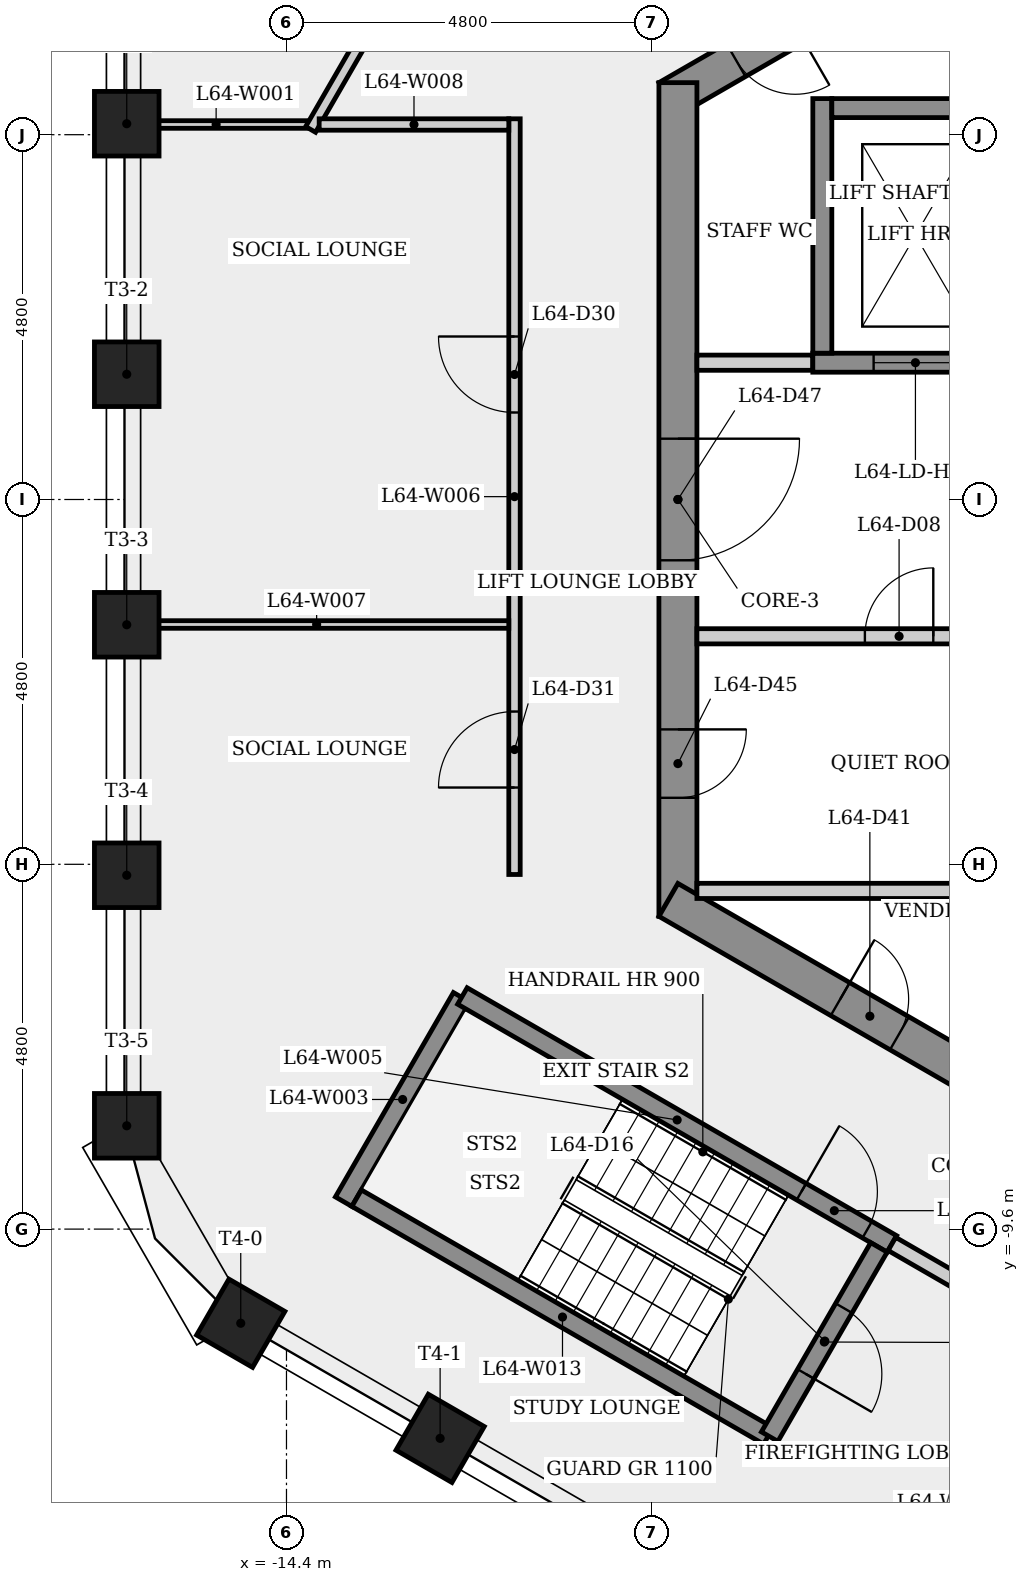
"""IFC4 building model, lengths in metres.
Left out: names, types, materials, properties, quantities, classifications, styles, units other than length and angle.
Written with IfcOpenShell. Run it as: python <this file> out.ifc"""

import sys

from ifc_helpers import new_model, si_unit, direction, frame, frame_2d, origin, origin_2d, place, context, subcontext, project, spatial, rectangle, extrude, element, fill, save


model = new_model("IFC4")
c1 = context("Model", 3, precision=1e-05, world=origin(), true_north=direction((0.0, 1.0)))
c2 = subcontext(c1, "Body", "Model", "MODEL_VIEW")
j1 = project(units=[si_unit("LENGTHUNIT", "METRE"), si_unit("PLANEANGLEUNIT", "RADIAN")], contexts=[c1])
p1 = place(None, origin())
s1 = spatial("IfcSite", under=j1, at=p1, CompositionType="ELEMENT")
p2 = place(p1, origin())
s2 = spatial("IfcBuilding", under=s1, at=p2, CompositionType="ELEMENT")
p3 = place(p2, frame((0.0, 0.0, 239.3)))
s3 = spatial("IfcBuildingStorey", under=s2, at=p3, CompositionType="ELEMENT", Elevation=239.3)
p4 = place(p3, frame((0.125, 10.753, 0.0), z_axis=(0.0, 0.0, 1.0), x_axis=(-0.866023993627, -0.500002442456, 0.0)))
e1 = element("IfcWall", 1, at=p4, inside=s3, PredefinedType="SHEAR", context=c2, shape_type="SweptSolid", body=[
    extrude(rectangle(XDim=10.97, YDim=0.5, at=frame_2d((5.485, 0.0))), origin(), (0.0, 0.0, 1.0), 3.4),
])
p5 = place(p4, frame((9.043, 0.0, 0.0)))
e2 = element("IfcOpeningElement", 2, at=p5, cuts=e1, PredefinedType="OPENING", context=c2, shape_type="SweptSolid", body=[
    extrude(rectangle(XDim=0.9, YDim=2.1, at=frame_2d((0.45, 1.05))), frame((0.0, 0.26, 0.0), z_axis=(0.0, -1.0, 0.0), x_axis=(1.0, 0.0, 0.0)), (0.0, 0.0, 1.0), 0.52),
])
p6 = place(p4, frame((2.38, 0.0, 0.0)))
e3 = element("IfcOpeningElement", 3, at=p6, cuts=e1, PredefinedType="OPENING", context=c2, shape_type="SweptSolid", body=[
    extrude(rectangle(XDim=0.9, YDim=2.1, at=frame_2d((0.45, 1.05))), frame((0.0, 0.26, 0.0), z_axis=(0.0, -1.0, 0.0), x_axis=(1.0, 0.0, 0.0)), (0.0, 0.0, 1.0), 0.52),
])
p7 = place(p3, frame((-9.25, 5.485, 0.0), z_axis=(0.0, 0.0, 1.0), x_axis=(0.0, -1.0, 0.0)))
e4 = element("IfcWall", 4, at=p7, inside=s3, PredefinedType="SHEAR", context=c2, shape_type="SweptSolid", body=[
    extrude(rectangle(XDim=10.97, YDim=0.5, at=frame_2d((5.485, 0.0))), origin(), (0.0, 0.0, 1.0), 3.4),
])
p8 = place(p7, frame((8.51, 0.0, 0.0)))
e5 = element("IfcOpeningElement", 5, at=p8, cuts=e4, PredefinedType="OPENING", context=c2, shape_type="SweptSolid", body=[
    extrude(rectangle(XDim=0.9, YDim=2.1, at=frame_2d((0.45, 1.05))), frame((0.0, 0.26, 0.0), z_axis=(0.0, -1.0, 0.0), x_axis=(1.0, 0.0, 0.0)), (0.0, 0.0, 1.0), 0.52),
])
p9 = place(p7, frame((4.685, 0.0, 0.0)))
e6 = element("IfcOpeningElement", 6, at=p9, cuts=e4, PredefinedType="OPENING", context=c2, shape_type="SweptSolid", body=[
    extrude(rectangle(XDim=1.6, YDim=2.1, at=frame_2d((0.8, 1.05))), frame((0.0, 0.26, 0.0), z_axis=(0.0, -1.0, 0.0), x_axis=(1.0, 0.0, 0.0)), (0.0, 0.0, 1.0), 0.52),
])
p10 = place(p3, frame((-9.375, -5.268, 0.0), z_axis=(0.0, 0.0, 1.0), x_axis=(0.866023993627, -0.500002442456, 0.0)))
e7 = element("IfcWall", 7, at=p10, inside=s3, PredefinedType="SHEAR", context=c2, shape_type="SweptSolid", body=[
    extrude(rectangle(XDim=10.97, YDim=0.5, at=frame_2d((5.485, 0.0))), origin(), (0.0, 0.0, 1.0), 3.4),
])
p11 = place(p10, frame((2.611, 0.0, 0.0)))
e8 = element("IfcOpeningElement", 8, at=p11, cuts=e7, PredefinedType="OPENING", context=c2, shape_type="SweptSolid", body=[
    extrude(rectangle(XDim=0.9, YDim=2.1, at=frame_2d((0.45, 1.05))), frame((0.0, 0.26, 0.0), z_axis=(0.0, -1.0, 0.0), x_axis=(1.0, 0.0, 0.0)), (0.0, 0.0, 1.0), 0.52),
])
p12 = place(p10, frame((7.229, 0.0, 0.0)))
e9 = element("IfcOpeningElement", 9, at=p12, cuts=e7, PredefinedType="OPENING", context=c2, shape_type="SweptSolid", body=[
    extrude(rectangle(XDim=0.9, YDim=2.1, at=frame_2d((0.45, 1.05))), frame((0.0, 0.26, 0.0), z_axis=(0.0, -1.0, 0.0), x_axis=(1.0, 0.0, 0.0)), (0.0, 0.0, 1.0), 0.52),
])
for number, where, z_axis, x_axis in (
    (10, (-16.502, 4.944, 0.0), (0.0, 0.0, 1.0), (-1.0, 0.0, 0.0)),
    (11, (-16.502, 1.648, 0.0), (0.0, 0.0, 1.0), (-1.0, 0.0, 0.0)),
    (12, (-16.502, -1.648, 0.0), (0.0, 0.0, 1.0), (-1.0, 0.0, 0.0)),
    (13, (-16.502, -4.944, 0.0), (0.0, 0.0, 1.0), (-1.0, 0.0, 0.0)),
    (14, (-16.502, -8.241, 0.0), (0.0, 0.0, 1.0), (-1.0, 0.0, 0.0)),
    (15, (-15.002, -10.839, 0.0), (0.0, 0.0, 1.0), (-0.5, -0.866, 0.0)),
    (16, (-12.379, -12.353, 0.0), (0.0, 0.0, 1.0), (-0.5, -0.866, 0.0)),
):
    element("IfcColumn", number, at=place(p3, frame(where, z_axis=z_axis, x_axis=x_axis)), inside=s3, PredefinedType="COLUMN", context=c2, shape_type="SweptSolid", body=[
        extrude(rectangle(XDim=0.85, YDim=0.85, at=origin_2d()), origin(), (0.0, 0.0, 1.0), 3.4),
    ])
p13 = place(p3, frame((-14.12, 4.934, 0.0), z_axis=(0.0, 0.0, 1.0), x_axis=(-1.0, 0.0, 0.0)))
e17 = element("IfcWall", 17, at=p13, inside=s3, PredefinedType="PARTITIONING", context=c2, shape_type="SweptSolid", body=[
    extrude(rectangle(XDim=2.412, YDim=0.1, at=frame_2d((1.206, 0.0))), origin(), (0.0, 0.0, 1.0), 3.05),
])
p14 = place(p3, frame((-14.083, 4.869, 0.0), z_axis=(0.0, 0.0, 1.0), x_axis=(0.500011139556, 0.866018972263, 0.0)))
e18 = element("IfcWall", 18, at=p14, inside=s3, PredefinedType="PARTITIONING", context=c2, shape_type="SweptSolid", body=[
    extrude(rectangle(XDim=6.076, YDim=0.15, at=frame_2d((3.038, 0.0))), origin(), (0.0, 0.0, 1.0), 3.05),
])
p15 = place(p14, frame((2.538, 0.0, 0.0)))
e19 = element("IfcOpeningElement", 19, at=p15, cuts=e18, PredefinedType="OPENING", context=c2, shape_type="SweptSolid", body=[
    extrude(rectangle(XDim=1.0, YDim=2.1, at=frame_2d((0.5, 1.05))), frame((0.0, 0.085, 0.0), z_axis=(0.0, -1.0, 0.0), x_axis=(1.0, 0.0, 0.0)), (0.0, 0.0, 1.0), 0.17),
])
p16 = place(p3, frame((-13.648, -9.239, 0.0), z_axis=(0.0, 0.0, 1.0), x_axis=(0.500003782172, 0.866023220135, 0.0)))
e20 = element("IfcWall", 20, at=p16, inside=s3, PredefinedType="SHEAR", context=c2, shape_type="SweptSolid", body=[
    extrude(rectangle(XDim=3.105, YDim=0.25, at=frame_2d((1.552, 0.0))), origin(), (0.0, 0.0, 1.0), 3.05),
])
p17 = place(p3, frame((-12.085, -6.532, 0.0), z_axis=(0.0, 0.0, 1.0), x_axis=(0.866031063448, -0.499990197047, 0.0)))
e21 = element("IfcWall", 21, at=p17, inside=s3, PredefinedType="SHEAR", context=c2, shape_type="SweptSolid", body=[
    extrude(rectangle(XDim=6.525, YDim=0.25, at=frame_2d((3.263, 0.0))), origin(), (0.0, 0.0, 1.0), 3.05),
])
p18 = place(p17, frame((5.15, 0.0, 0.0)))
e22 = element("IfcOpeningElement", 22, at=p18, cuts=e21, PredefinedType="OPENING", context=c2, shape_type="SweptSolid", body=[
    extrude(rectangle(XDim=1.0, YDim=2.1, at=frame_2d((0.5, 1.05))), frame((0.0, 0.135, 0.0), z_axis=(0.0, -1.0, 0.0), x_axis=(1.0, 0.0, 0.0)), (0.0, 0.0, 1.0), 0.27),
])
p19 = place(p3, frame((-11.4, -4.934, 0.0), z_axis=(0.0, 0.0, 1.0), x_axis=(0.0, 1.0, 0.0)))
e23 = element("IfcWall", 23, at=p19, inside=s3, PredefinedType="PARTITIONING", context=c2, shape_type="SweptSolid", body=[
    extrude(rectangle(XDim=9.943, YDim=0.15, at=frame_2d((4.972, 0.0))), origin(), (0.0, 0.0, 1.0), 3.05),
])
p20 = place(p19, frame((6.079, 0.0, 0.0)))
e24 = element("IfcOpeningElement", 24, at=p20, cuts=e23, PredefinedType="OPENING", context=c2, shape_type="SweptSolid", body=[
    extrude(rectangle(XDim=1.0, YDim=2.1, at=frame_2d((0.5, 1.05))), frame((0.0, 0.085, 0.0), z_axis=(0.0, -1.0, 0.0), x_axis=(1.0, 0.0, 0.0)), (0.0, 0.0, 1.0), 0.17),
])
p21 = place(p19, frame((1.144, 0.0, 0.0)))
e25 = element("IfcOpeningElement", 25, at=p21, cuts=e23, PredefinedType="OPENING", context=c2, shape_type="SweptSolid", body=[
    extrude(rectangle(XDim=1.0, YDim=2.1, at=frame_2d((0.5, 1.05))), frame((0.0, 0.085, 0.0), z_axis=(0.0, -1.0, 0.0), x_axis=(1.0, 0.0, 0.0)), (0.0, 0.0, 1.0), 0.17),
])
p22 = place(p3, frame((-11.475, -1.645, 0.0), z_axis=(0.0, 0.0, 1.0), x_axis=(-1.0, 0.0, 0.0)))
e26 = element("IfcWall", 26, at=p22, inside=s3, PredefinedType="PARTITIONING", context=c2, shape_type="SweptSolid", body=[
    extrude(rectangle(XDim=5.056, YDim=0.1, at=frame_2d((2.528, 0.0))), origin(), (0.0, 0.0, 1.0), 3.05),
])
p23 = place(p3, frame((-11.475, 4.934, 0.0), z_axis=(0.0, 0.0, 1.0), x_axis=(-1.0, 0.0, 0.0)))
e27 = element("IfcWall", 27, at=p23, inside=s3, PredefinedType="PARTITIONING", context=c2, shape_type="SweptSolid", body=[
    extrude(rectangle(XDim=2.495, YDim=0.15, at=frame_2d((1.248, 0.0))), origin(), (0.0, 0.0, 1.0), 3.05),
])
p24 = place(p3, frame((-9.0, 1.8, 0.0), z_axis=(0.0, 0.0, 1.0), x_axis=(1.0, 0.0, 0.0)))
e28 = element("IfcWall", 28, at=p24, inside=s3, PredefinedType="PARTITIONING", context=c2, shape_type="SweptSolid", body=[
    extrude(rectangle(XDim=1.525, YDim=0.2, at=frame_2d((0.763, 0.0))), origin(), (0.0, 0.0, 1.0), 3.05),
])
p25 = place(p3, frame((-9.0, -5.15, 0.0), z_axis=(0.0, 0.0, 1.0), x_axis=(1.0, 0.0, 0.0)))
e29 = element("IfcWall", 29, at=p25, inside=s3, PredefinedType="PARTITIONING", context=c2, shape_type="SweptSolid", body=[
    extrude(rectangle(XDim=11.325, YDim=0.2, at=frame_2d((5.663, 0.0))), origin(), (0.0, 0.0, 1.0), 3.05),
])
p26 = place(p3, frame((-8.06, -12.321, 0.0), z_axis=(0.0, 0.0, 1.0), x_axis=(-0.866029591389, 0.499992746786, 0.0)))
e30 = element("IfcWall", 30, at=p26, inside=s3, PredefinedType="SHEAR", context=c2, shape_type="SweptSolid", body=[
    extrude(rectangle(XDim=6.255, YDim=0.25, at=frame_2d((3.127, 0.0))), origin(), (0.0, 0.0, 1.0), 3.05),
])
p27 = place(p3, frame((-7.475, 1.8, 0.0), z_axis=(0.0, 0.0, 1.0), x_axis=(1.0, 0.0, 0.0)))
e31 = element("IfcWall", 31, at=p27, inside=s3, PredefinedType="SHEAR", context=c2, shape_type="SweptSolid", body=[
    extrude(rectangle(XDim=14.95, YDim=0.25, at=frame_2d((7.475, 0.0))), origin(), (0.0, 0.0, 1.0), 3.05),
])
p28 = place(p27, frame((0.8, 0.0, 0.0)))
e32 = element("IfcOpeningElement", 32, at=p28, cuts=e31, PredefinedType="OPENING", context=c2, shape_type="SweptSolid", body=[
    extrude(rectangle(XDim=1.1, YDim=2.1, at=frame_2d((0.55, 1.05))), frame((0.0, 0.135, 0.0), z_axis=(0.0, -1.0, 0.0), x_axis=(1.0, 0.0, 0.0)), (0.0, 0.0, 1.0), 0.27),
])
p29 = place(p27, frame((3.25, 0.0, 0.0)))
e33 = element("IfcOpeningElement", 33, at=p29, cuts=e31, PredefinedType="OPENING", context=c2, shape_type="SweptSolid", body=[
    extrude(rectangle(XDim=1.1, YDim=2.1, at=frame_2d((0.55, 1.05))), frame((0.0, 0.135, 0.0), z_axis=(0.0, -1.0, 0.0), x_axis=(1.0, 0.0, 0.0)), (0.0, 0.0, 1.0), 0.27),
])
p30 = place(p27, frame((5.7, 0.0, 0.0)))
e34 = element("IfcOpeningElement", 34, at=p30, cuts=e31, PredefinedType="OPENING", context=c2, shape_type="SweptSolid", body=[
    extrude(rectangle(XDim=1.1, YDim=2.1, at=frame_2d((0.55, 1.05))), frame((0.0, 0.135, 0.0), z_axis=(0.0, -1.0, 0.0), x_axis=(1.0, 0.0, 0.0)), (0.0, 0.0, 1.0), 0.27),
])
p31 = place(p27, frame((8.15, 0.0, 0.0)))
e35 = element("IfcOpeningElement", 35, at=p31, cuts=e31, PredefinedType="OPENING", context=c2, shape_type="SweptSolid", body=[
    extrude(rectangle(XDim=1.1, YDim=2.1, at=frame_2d((0.55, 1.05))), frame((0.0, 0.135, 0.0), z_axis=(0.0, -1.0, 0.0), x_axis=(1.0, 0.0, 0.0)), (0.0, 0.0, 1.0), 0.27),
])
p32 = place(p27, frame((10.6, 0.0, 0.0)))
e36 = element("IfcOpeningElement", 36, at=p32, cuts=e31, PredefinedType="OPENING", context=c2, shape_type="SweptSolid", body=[
    extrude(rectangle(XDim=1.1, YDim=2.1, at=frame_2d((0.55, 1.05))), frame((0.0, 0.135, 0.0), z_axis=(0.0, -1.0, 0.0), x_axis=(1.0, 0.0, 0.0)), (0.0, 0.0, 1.0), 0.27),
])
p33 = place(p27, frame((13.05, 0.0, 0.0)))
e37 = element("IfcOpeningElement", 37, at=p33, cuts=e31, PredefinedType="OPENING", context=c2, shape_type="SweptSolid", body=[
    extrude(rectangle(XDim=1.1, YDim=2.1, at=frame_2d((0.55, 1.05))), frame((0.0, 0.135, 0.0), z_axis=(0.0, -1.0, 0.0), x_axis=(1.0, 0.0, 0.0)), (0.0, 0.0, 1.0), 0.27),
])
p34 = place(p3, frame((-7.35, 1.925, 0.0), z_axis=(0.0, 0.0, 1.0), x_axis=(0.0, 1.0, 0.0)))
e38 = element("IfcWall", 38, at=p34, inside=s3, PredefinedType="SHEAR", context=c2, shape_type="SweptSolid", body=[
    extrude(rectangle(XDim=3.35, YDim=0.25, at=frame_2d((1.675, 0.0))), origin(), (0.0, 0.0, 1.0), 3.05),
])
p35 = place(p3, frame((-7.225, 5.15, 0.0), z_axis=(0.0, 0.0, 1.0), x_axis=(1.0, 0.0, 0.0)))
e39 = element("IfcWall", 39, at=p35, inside=s3, PredefinedType="SHEAR", context=c2, shape_type="SweptSolid", body=[
    extrude(rectangle(XDim=14.7, YDim=0.25, at=frame_2d((7.35, 0.0))), origin(), (0.0, 0.0, 1.0), 3.05),
])
p36 = place(p3, frame((-6.605, -9.841, 0.0), z_axis=(0.0, 0.0, 1.0), x_axis=(-0.500011588718, -0.866018712932, 0.0)))
e40 = element("IfcWall", 40, at=p36, inside=s3, PredefinedType="SHEAR", context=c2, shape_type="SweptSolid", body=[
    extrude(rectangle(XDim=2.875, YDim=0.25, at=frame_2d((1.438, 0.0))), origin(), (0.0, 0.0, 1.0), 3.05),
])
p37 = place(p36, frame((0.923, 0.0, 0.0)))
e41 = element("IfcOpeningElement", 41, at=p37, cuts=e40, PredefinedType="OPENING", context=c2, shape_type="SweptSolid", body=[
    extrude(rectangle(XDim=1.0, YDim=2.1, at=frame_2d((0.5, 1.05))), frame((0.0, 0.135, 0.0), z_axis=(0.0, -1.0, 0.0), x_axis=(1.0, 0.0, 0.0)), (0.0, 0.0, 1.0), 0.27),
])
p38 = place(p3, frame((-6.435, -9.795, 0.0), z_axis=(0.0, 0.0, 1.0), x_axis=(0.866012907634, -0.500021643343, 0.0)))
e42 = element("IfcWall", 42, at=p38, inside=s3, PredefinedType="PARTITIONING", context=c2, shape_type="SweptSolid", body=[
    extrude(rectangle(XDim=4.45, YDim=0.2, at=frame_2d((2.225, 0.0))), origin(), (0.0, 0.0, 1.0), 3.05),
])
p39 = place(p38, frame((1.675, 0.0, 0.0)))
e43 = element("IfcOpeningElement", 43, at=p39, cuts=e42, PredefinedType="OPENING", context=c2, shape_type="SweptSolid", body=[
    extrude(rectangle(XDim=1.1, YDim=2.1, at=frame_2d((0.55, 1.05))), frame((0.0, 0.11, 0.0), z_axis=(0.0, -1.0, 0.0), x_axis=(1.0, 0.0, 0.0)), (0.0, 0.0, 1.0), 0.22),
])
p40 = place(p3, frame((-9.0, -1.8, 0.0), z_axis=(0.0, 0.0, 1.0), x_axis=(1.0, 0.0, 0.0)))
e44 = element("IfcWall", 44, at=p40, inside=s3, PredefinedType="PARTITIONING", context=c2, shape_type="SweptSolid", body=[
    extrude(rectangle(XDim=11.325, YDim=0.2, at=frame_2d((5.663, 0.0))), origin(), (0.0, 0.0, 1.0), 3.05),
])
p41 = place(p40, frame((2.21, 0.0, 0.0)))
e45 = element("IfcOpeningElement", 45, at=p41, cuts=e44, PredefinedType="OPENING", context=c2, shape_type="SweptSolid", body=[
    extrude(rectangle(XDim=0.9, YDim=2.1, at=frame_2d((0.45, 1.05))), frame((0.0, 0.11, 0.0), z_axis=(0.0, -1.0, 0.0), x_axis=(1.0, 0.0, 0.0)), (0.0, 0.0, 1.0), 0.22),
])
p42 = place(p40, frame((6.71, 0.0, 0.0)))
e46 = element("IfcOpeningElement", 46, at=p42, cuts=e44, PredefinedType="OPENING", context=c2, shape_type="SweptSolid", body=[
    extrude(rectangle(XDim=0.9, YDim=2.1, at=frame_2d((0.45, 1.05))), frame((0.0, 0.11, 0.0), z_axis=(0.0, -1.0, 0.0), x_axis=(1.0, 0.0, 0.0)), (0.0, 0.0, 1.0), 0.22),
])
p43 = place(p40, frame((9.713, 0.0, 0.0)))
e47 = element("IfcOpeningElement", 47, at=p43, cuts=e44, PredefinedType="OPENING", context=c2, shape_type="SweptSolid", body=[
    extrude(rectangle(XDim=0.9, YDim=2.1, at=frame_2d((0.45, 1.05))), frame((0.0, 0.11, 0.0), z_axis=(0.0, -1.0, 0.0), x_axis=(1.0, 0.0, 0.0)), (0.0, 0.0, 1.0), 0.22),
])
p44 = place(p28, origin())
e48 = element("IfcDoor", 48, at=p44, inside=s3, OperationType="SLIDING_TO_LEFT", PredefinedType="DOOR", context=c2, shape_type="SweptSolid", body=[
    extrude(rectangle(XDim=1.1, YDim=2.1, at=frame_2d((0.55, 1.05))), frame((0.0, 0.025, 0.0), z_axis=(0.0, -1.0, 0.0), x_axis=(1.0, 0.0, 0.0)), (0.0, 0.0, 1.0), 0.05),
])
fill(e32, e48)
p45 = place(p41, origin())
e49 = element("IfcDoor", 49, at=p45, inside=s3, OperationType="SINGLE_SWING_RIGHT", PredefinedType="DOOR", context=c2, shape_type="SweptSolid", body=[
    extrude(rectangle(XDim=0.9, YDim=2.1, at=frame_2d((0.45, 1.05))), frame((0.0, 0.025, 0.0), z_axis=(0.0, -1.0, 0.0), x_axis=(1.0, 0.0, 0.0)), (0.0, 0.0, 1.0), 0.05),
])
fill(e45, e49)
p46 = place(p18, origin())
e50 = element("IfcDoor", 50, at=p46, inside=s3, OperationType="SINGLE_SWING_LEFT", PredefinedType="DOOR", context=c2, shape_type="SweptSolid", body=[
    extrude(rectangle(XDim=1.0, YDim=2.1, at=frame_2d((0.5, 1.05))), frame((0.0, 0.025, 0.0), z_axis=(0.0, -1.0, 0.0), x_axis=(1.0, 0.0, 0.0)), (0.0, 0.0, 1.0), 0.05),
])
fill(e22, e50)
p47 = place(p37, origin())
e51 = element("IfcDoor", 51, at=p47, inside=s3, OperationType="SINGLE_SWING_RIGHT", PredefinedType="DOOR", context=c2, shape_type="SweptSolid", body=[
    extrude(rectangle(XDim=1.0, YDim=2.1, at=frame_2d((0.5, 1.05))), frame((0.0, 0.025, 0.0), z_axis=(0.0, -1.0, 0.0), x_axis=(1.0, 0.0, 0.0)), (0.0, 0.0, 1.0), 0.05),
])
fill(e41, e51)
p48 = place(p20, origin())
e52 = element("IfcDoor", 52, at=p48, inside=s3, OperationType="SINGLE_SWING_RIGHT", PredefinedType="DOOR", context=c2, shape_type="SweptSolid", body=[
    extrude(rectangle(XDim=1.0, YDim=2.1, at=frame_2d((0.5, 1.05))), frame((0.0, 0.025, 0.0), z_axis=(0.0, -1.0, 0.0), x_axis=(1.0, 0.0, 0.0)), (0.0, 0.0, 1.0), 0.05),
])
fill(e24, e52)
p49 = place(p21, origin())
e53 = element("IfcDoor", 53, at=p49, inside=s3, OperationType="SINGLE_SWING_LEFT", PredefinedType="DOOR", context=c2, shape_type="SweptSolid", body=[
    extrude(rectangle(XDim=1.0, YDim=2.1, at=frame_2d((0.5, 1.05))), frame((0.0, 0.025, 0.0), z_axis=(0.0, -1.0, 0.0), x_axis=(1.0, 0.0, 0.0)), (0.0, 0.0, 1.0), 0.05),
])
fill(e25, e53)
p50 = place(p5, origin())
e54 = element("IfcDoor", 54, at=p50, inside=s3, OperationType="SINGLE_SWING_LEFT", PredefinedType="DOOR", context=c2, shape_type="SweptSolid", body=[
    extrude(rectangle(XDim=0.9, YDim=2.1, at=frame_2d((0.45, 1.05))), frame((0.0, 0.025, 0.0), z_axis=(0.0, -1.0, 0.0), x_axis=(1.0, 0.0, 0.0)), (0.0, 0.0, 1.0), 0.05),
])
fill(e2, e54)
p51 = place(p11, origin())
e55 = element("IfcDoor", 55, at=p51, inside=s3, OperationType="SINGLE_SWING_LEFT", PredefinedType="DOOR", context=c2, shape_type="SweptSolid", body=[
    extrude(rectangle(XDim=0.9, YDim=2.1, at=frame_2d((0.45, 1.05))), frame((0.0, 0.025, 0.0), z_axis=(0.0, -1.0, 0.0), x_axis=(1.0, 0.0, 0.0)), (0.0, 0.0, 1.0), 0.05),
])
fill(e8, e55)
p52 = place(p8, origin())
e56 = element("IfcDoor", 56, at=p52, inside=s3, OperationType="SINGLE_SWING_LEFT", PredefinedType="DOOR", context=c2, shape_type="SweptSolid", body=[
    extrude(rectangle(XDim=0.9, YDim=2.1, at=frame_2d((0.45, 1.05))), frame((0.0, 0.025, 0.0), z_axis=(0.0, -1.0, 0.0), x_axis=(1.0, 0.0, 0.0)), (0.0, 0.0, 1.0), 0.05),
])
fill(e5, e56)
p53 = place(p9, origin())
e57 = element("IfcDoor", 57, at=p53, inside=s3, OperationType="SINGLE_SWING_LEFT", PredefinedType="DOOR", context=c2, shape_type="SweptSolid", body=[
    extrude(rectangle(XDim=1.6, YDim=2.1, at=frame_2d((0.8, 1.05))), frame((0.0, 0.025, 0.0), z_axis=(0.0, -1.0, 0.0), x_axis=(1.0, 0.0, 0.0)), (0.0, 0.0, 1.0), 0.05),
])
fill(e6, e57)
save(model, sys.argv[1])
